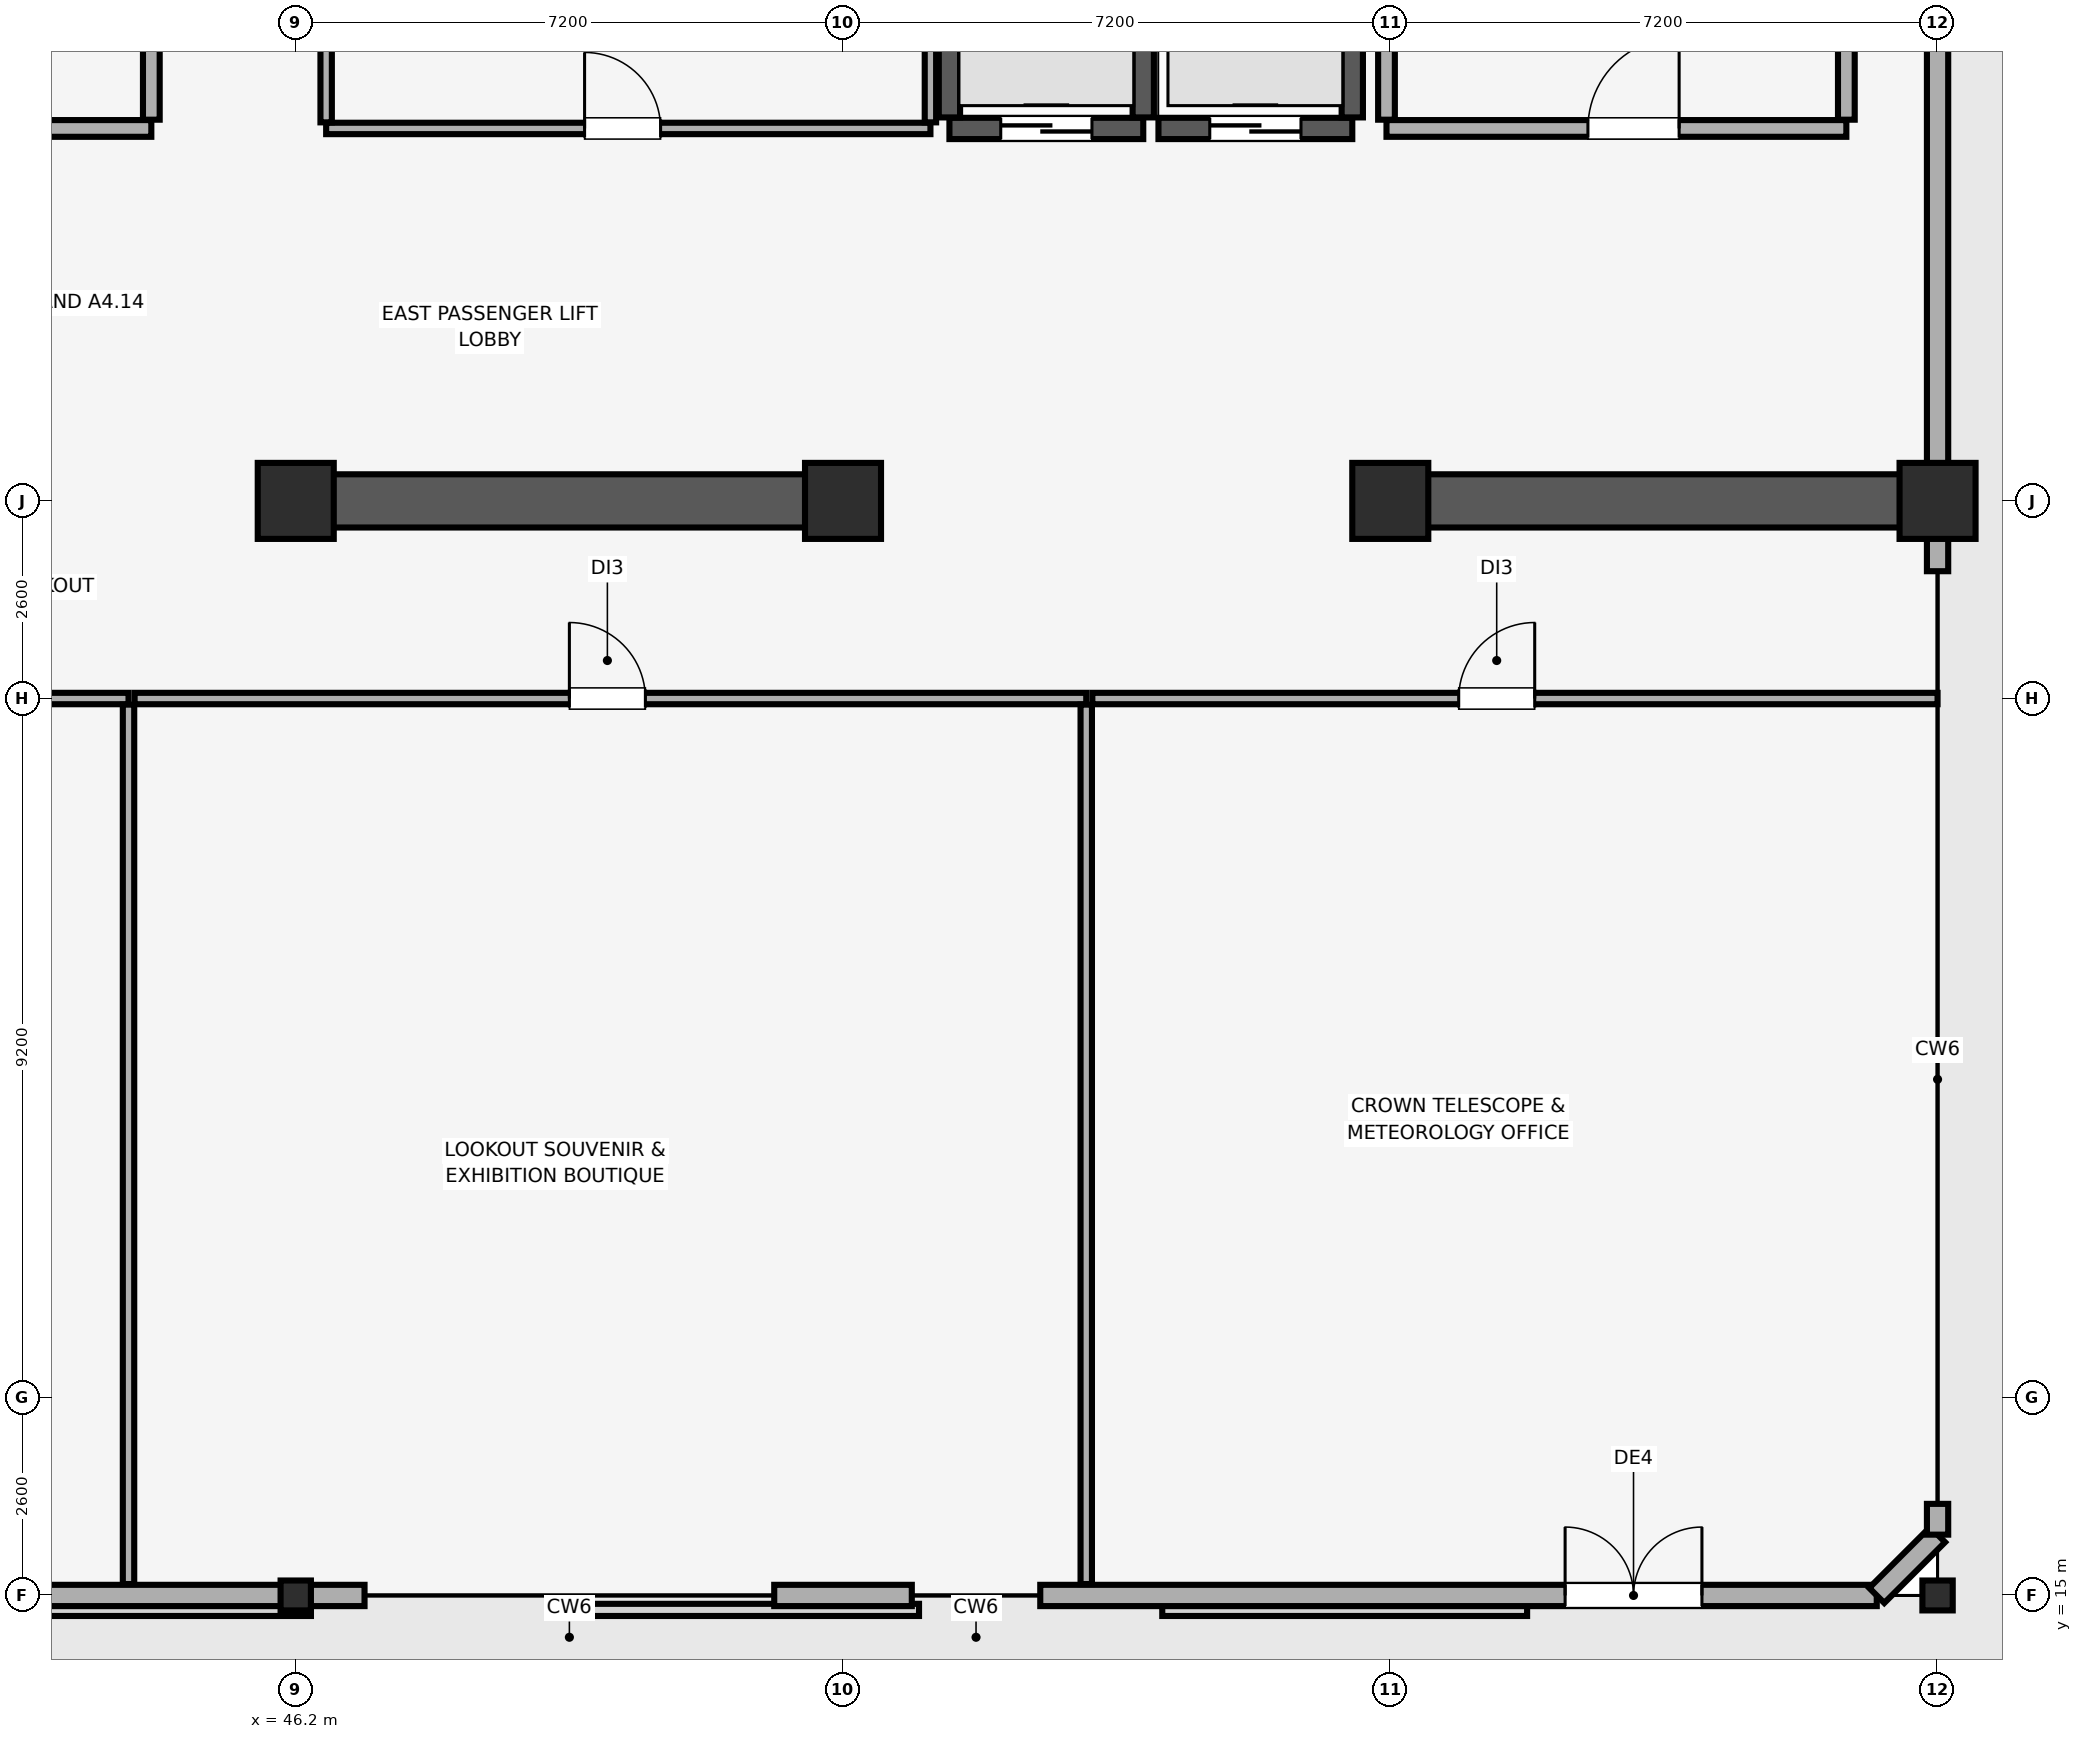
"""IFC4 building model, lengths in metres.
Left out: names, types, materials, properties, quantities, classifications, styles, units other than length and angle.
Written with IfcOpenShell. Run it as: python <this file> out.ifc"""

import sys

from ifc_helpers import new_model, si_unit, direction, frame, frame_2d, origin, origin_2d, place, context, subcontext, project, spatial, rectangle, i_section, extrude, element, fill, save


model = new_model("IFC4")
c1 = context("Model", 3, precision=1e-05, world=origin(), true_north=direction((0.0, 1.0)))
c2 = subcontext(c1, "Body", "Model", "MODEL_VIEW")
j1 = project(units=[si_unit("LENGTHUNIT", "METRE"), si_unit("PLANEANGLEUNIT", "RADIAN")], contexts=[c1])
p1 = place(None, origin())
s1 = spatial("IfcSite", under=j1, at=p1, CompositionType="ELEMENT")
p2 = place(p1, origin())
s2 = spatial("IfcBuilding", under=s1, at=p2, CompositionType="ELEMENT")
p3 = place(p2, frame((0.0, 0.0, 310.7)))
s3 = spatial("IfcBuildingStorey", under=s2, at=p3, CompositionType="ELEMENT", Elevation=310.7)
for number, where, z_axis, x_axis in (
    (1, (46.2, 29.4, 0.0), (0.0, 0.0, 1.0), (1.0, 0.0, 0.0)),
    (2, (53.4, 29.4, 0.0), (0.0, 0.0, 1.0), (1.0, 0.0, 0.0)),
    (3, (60.6, 29.4, 0.0), (0.0, 0.0, 1.0), (1.0, 0.0, 0.0)),
    (4, (67.8, 29.4, 0.0), (0.0, 0.0, 1.0), (1.0, 0.0, 0.0)),
):
    element("IfcColumn", number, at=place(p3, frame(where, z_axis=z_axis, x_axis=x_axis)), inside=s3, PredefinedType="COLUMN", context=c2, shape_type="SweptSolid", body=[
        extrude(rectangle(XDim=1.0, YDim=1.0, at=origin_2d()), origin(), (0.0, 0.0, 1.0), 7.5),
    ])
for number, where, z_axis, x_axis in (
    (5, (46.2, 15.0, 0.0), (0.0, 0.0, 1.0), (1.0, 0.0, 0.0)),
    (6, (67.8, 15.0, 0.0), (0.0, 0.0, 1.0), (1.0, 0.0, 0.0)),
):
    element("IfcColumn", number, at=place(p3, frame(where, z_axis=z_axis, x_axis=x_axis)), inside=s3, PredefinedType="COLUMN", context=c2, shape_type="SweptSolid", body=[
        extrude(i_section(OverallWidth=0.399, OverallDepth=0.394, WebThickness=0.023, FlangeThickness=0.037, FilletRadius=0.015, at=origin_2d()), origin(), (0.0, 0.0, 1.0), 7.5),
    ])
p4 = place(p3, frame((36.895, 15.0, 0.0), z_axis=(0.0, 0.0, 1.0), x_axis=(1.0, 0.0, 0.0)))
e7 = element("IfcWall", 7, at=p4, inside=s3, PredefinedType="SOLIDWALL", context=c2, shape_type="SweptSolid", body=[
    extrude(rectangle(XDim=10.21, YDim=0.28, at=frame_2d((5.105, 0.0))), origin(), (0.0, 0.0, 1.0), 7.0),
])
p5 = place(p4, frame((3.405, 0.0, 0.0)))
e8 = element("IfcOpeningElement", 8, at=p5, cuts=e7, PredefinedType="OPENING", context=c2, shape_type="SweptSolid", body=[
    extrude(rectangle(XDim=1.8, YDim=2.3, at=frame_2d((0.9, 1.15))), frame((0.0, 0.15, 0.0), z_axis=(0.0, -1.0, 0.0), x_axis=(1.0, 0.0, 0.0)), (0.0, 0.0, 1.0), 0.3),
])
p6 = place(p3, frame((52.495, 15.0, 0.0), z_axis=(0.0, 0.0, 1.0), x_axis=(1.0, 0.0, 0.0)))
e9 = element("IfcWall", 9, at=p6, inside=s3, PredefinedType="SOLIDWALL", context=c2, shape_type="SweptSolid", body=[
    extrude(rectangle(XDim=1.81, YDim=0.28, at=frame_2d((0.905, 0.0))), origin(), (0.0, 0.0, 1.0), 7.0),
])
p7 = place(p3, frame((55.995, 15.0, 0.0), z_axis=(0.0, 0.0, 1.0), x_axis=(1.0, 0.0, 0.0)))
e10 = element("IfcWall", 10, at=p7, inside=s3, PredefinedType="SOLIDWALL", context=c2, shape_type="SweptSolid", body=[
    extrude(rectangle(XDim=11.005, YDim=0.28, at=frame_2d((5.502, 0.0))), origin(), (0.0, 0.0, 1.0), 7.0),
])
p8 = place(p7, frame((6.905, 0.0, 0.0)))
e11 = element("IfcOpeningElement", 11, at=p8, cuts=e10, PredefinedType="OPENING", context=c2, shape_type="SweptSolid", body=[
    extrude(rectangle(XDim=1.8, YDim=2.3, at=frame_2d((0.9, 1.15))), frame((0.0, 0.15, 0.0), z_axis=(0.0, -1.0, 0.0), x_axis=(1.0, 0.0, 0.0)), (0.0, 0.0, 1.0), 0.3),
])
p9 = place(p3, frame((67.0, 15.0, 0.0), z_axis=(0.0, 0.0, 1.0), x_axis=(0.707106781187, 0.707106781187, 0.0)))
e12 = element("IfcWall", 12, at=p9, inside=s3, PredefinedType="SOLIDWALL", context=c2, shape_type="SweptSolid", body=[
    extrude(rectangle(XDim=1.131, YDim=0.28, at=frame_2d((0.566, 0.0))), origin(), (0.0, 0.0, 1.0), 7.5),
])
p10 = place(p3, frame((67.8, 15.8, 0.0), z_axis=(0.0, 0.0, 1.0), x_axis=(0.0, 1.0, 0.0)))
e13 = element("IfcWall", 13, at=p10, inside=s3, PredefinedType="SOLIDWALL", context=c2, shape_type="SweptSolid", body=[
    extrude(rectangle(XDim=0.405, YDim=0.28, at=frame_2d((0.203, 0.0))), origin(), (0.0, 0.0, 1.0), 7.2),
])
p11 = place(p3, frame((67.8, 28.475, 0.0), z_axis=(0.0, 0.0, 1.0), x_axis=(0.0, 1.0, 0.0)))
e14 = element("IfcWall", 14, at=p11, inside=s3, PredefinedType="SOLIDWALL", context=c2, shape_type="SweptSolid", body=[
    extrude(rectangle(XDim=19.725, YDim=0.28, at=frame_2d((9.862, 0.0))), origin(), (0.0, 0.0, 1.0), 7.2),
])
p12 = place(p3, frame((46.0, 29.4, 0.0), z_axis=(0.0, 0.0, 1.0), x_axis=(1.0, 0.0, 0.0)))
e15 = element("IfcWall", 15, at=p12, inside=s3, PredefinedType="SHEAR", context=c2, shape_type="SweptSolid", body=[
    extrude(rectangle(XDim=7.6, YDim=0.7, at=frame_2d((3.8, 0.0))), origin(), (0.0, 0.0, 1.0), 7.5),
])
p13 = place(p3, frame((60.4, 29.4, 0.0), z_axis=(0.0, 0.0, 1.0), x_axis=(1.0, 0.0, 0.0)))
e16 = element("IfcWall", 16, at=p13, inside=s3, PredefinedType="SHEAR", context=c2, shape_type="SweptSolid", body=[
    extrude(rectangle(XDim=7.255, YDim=0.7, at=frame_2d((3.627, 0.0))), origin(), (0.0, 0.0, 1.0), 7.5),
])
p14 = place(p3, frame((54.8, 34.3, 0.0), z_axis=(0.0, 0.0, 1.0), x_axis=(1.0, 0.0, 0.0)))
e17 = element("IfcWall", 17, at=p14, inside=s3, PredefinedType="SHEAR", context=c2, shape_type="SweptSolid", body=[
    extrude(rectangle(XDim=2.55, YDim=0.28, at=frame_2d((1.275, 0.0))), origin(), (0.0, 0.0, 1.0), 7.5),
])
p15 = place(p14, frame((0.675, 0.0, 0.0)))
e18 = element("IfcOpeningElement", 18, at=p15, cuts=e17, PredefinedType="OPENING", context=c2, shape_type="SweptSolid", body=[
    extrude(rectangle(XDim=1.2, YDim=2.25, at=frame_2d((0.6, 1.125))), frame((0.0, 0.15, 0.0), z_axis=(0.0, -1.0, 0.0), x_axis=(1.0, 0.0, 0.0)), (0.0, 0.0, 1.0), 0.3),
])
for number, where, z_axis, x_axis in (
    (19, (54.8, 34.445, 0.0), (0.0, 0.0, 1.0), (0.0, 1.0, 0.0)),
    (20, (57.35, 34.445, 0.0), (0.0, 0.0, 1.0), (0.0, 1.0, 0.0)),
):
    element("IfcWall", number, at=place(p3, frame(where, z_axis=z_axis, x_axis=x_axis)), inside=s3, PredefinedType="SHEAR", context=c2, shape_type="SweptSolid", body=[
        extrude(rectangle(XDim=2.11, YDim=0.28, at=frame_2d((1.055, 0.0))), origin(), (0.0, 0.0, 1.0), 7.5),
    ])
p16 = place(p3, frame((57.55, 34.3, 0.0), z_axis=(0.0, 0.0, 1.0), x_axis=(1.0, 0.0, 0.0)))
e21 = element("IfcWall", 21, at=p16, inside=s3, PredefinedType="SHEAR", context=c2, shape_type="SweptSolid", body=[
    extrude(rectangle(XDim=2.55, YDim=0.28, at=frame_2d((1.275, 0.0))), origin(), (0.0, 0.0, 1.0), 7.5),
])
p17 = place(p16, frame((0.675, 0.0, 0.0)))
e22 = element("IfcOpeningElement", 22, at=p17, cuts=e21, PredefinedType="OPENING", context=c2, shape_type="SweptSolid", body=[
    extrude(rectangle(XDim=1.2, YDim=2.25, at=frame_2d((0.6, 1.125))), frame((0.0, 0.15, 0.0), z_axis=(0.0, -1.0, 0.0), x_axis=(1.0, 0.0, 0.0)), (0.0, 0.0, 1.0), 0.3),
])
p18 = place(p3, frame((60.1, 34.445, 0.0), z_axis=(0.0, 0.0, 1.0), x_axis=(0.0, 1.0, 0.0)))
e23 = element("IfcWall", 23, at=p18, inside=s3, PredefinedType="SHEAR", context=c2, shape_type="SweptSolid", body=[
    extrude(rectangle(XDim=2.11, YDim=0.28, at=frame_2d((1.055, 0.0))), origin(), (0.0, 0.0, 1.0), 7.5),
])
p19 = place(p3, frame((60.55, 34.3, 0.0), z_axis=(0.0, 0.0, 1.0), x_axis=(1.0, 0.0, 0.0)))
e24 = element("IfcWall", 24, at=p19, inside=s3, PredefinedType="PARTITIONING", context=c2, shape_type="SweptSolid", body=[
    extrude(rectangle(XDim=6.05, YDim=0.22, at=frame_2d((3.025, 0.0))), origin(), (0.0, 0.0, 1.0), 7.5),
])
p20 = place(p19, frame((2.65, 0.0, 0.0)))
e25 = element("IfcOpeningElement", 25, at=p20, cuts=e24, PredefinedType="OPENING", context=c2, shape_type="SweptSolid", body=[
    extrude(rectangle(XDim=1.2, YDim=2.15, at=frame_2d((0.6, 1.075))), frame((0.0, 0.12, 0.0), z_axis=(0.0, -1.0, 0.0), x_axis=(1.0, 0.0, 0.0)), (0.0, 0.0, 1.0), 0.24),
])
p21 = place(p3, frame((60.55, 34.415, 0.0), z_axis=(0.0, 0.0, 1.0), x_axis=(0.0, 1.0, 0.0)))
e26 = element("IfcWall", 26, at=p21, inside=s3, PredefinedType="PARTITIONING", context=c2, shape_type="SweptSolid", body=[
    extrude(rectangle(XDim=5.64, YDim=0.22, at=frame_2d((2.82, 0.0))), origin(), (0.0, 0.0, 1.0), 7.5),
])
p22 = place(p3, frame((66.6, 34.415, 0.0), z_axis=(0.0, 0.0, 1.0), x_axis=(0.0, 1.0, 0.0)))
e27 = element("IfcWall", 27, at=p22, inside=s3, PredefinedType="PARTITIONING", context=c2, shape_type="SweptSolid", body=[
    extrude(rectangle(XDim=5.43, YDim=0.22, at=frame_2d((2.715, 0.0))), origin(), (0.0, 0.0, 1.0), 7.5),
])
p23 = place(p3, frame((39.7, 34.3, 0.0), z_axis=(0.0, 0.0, 1.0), x_axis=(1.0, 0.0, 0.0)))
e28 = element("IfcWall", 28, at=p23, inside=s3, PredefinedType="PARTITIONING", context=c2, shape_type="SweptSolid", body=[
    extrude(rectangle(XDim=4.6, YDim=0.22, at=frame_2d((2.3, 0.0))), origin(), (0.0, 0.0, 1.0), 7.5),
])
p24 = place(p23, frame((1.7, 0.0, 0.0)))
e29 = element("IfcOpeningElement", 29, at=p24, cuts=e28, PredefinedType="OPENING", context=c2, shape_type="SweptSolid", body=[
    extrude(rectangle(XDim=1.2, YDim=2.15, at=frame_2d((0.6, 1.075))), frame((0.0, 0.12, 0.0), z_axis=(0.0, -1.0, 0.0), x_axis=(1.0, 0.0, 0.0)), (0.0, 0.0, 1.0), 0.24),
])
p25 = place(p3, frame((44.3, 34.415, 0.0), z_axis=(0.0, 0.0, 1.0), x_axis=(0.0, 1.0, 0.0)))
e30 = element("IfcWall", 30, at=p25, inside=s3, PredefinedType="PARTITIONING", context=c2, shape_type="SweptSolid", body=[
    extrude(rectangle(XDim=5.785, YDim=0.22, at=frame_2d((2.893, 0.0))), origin(), (0.0, 0.0, 1.0), 7.5),
])
p26 = place(p3, frame((46.6, 34.3, 0.0), z_axis=(0.0, 0.0, 1.0), x_axis=(1.0, 0.0, 0.0)))
e31 = element("IfcWall", 31, at=p26, inside=s3, PredefinedType="PARTITIONING", context=c2, shape_type="SweptSolid", body=[
    extrude(rectangle(XDim=7.95, YDim=0.15, at=frame_2d((3.975, 0.0))), origin(), (0.0, 0.0, 1.0), 7.5),
])
p27 = place(p26, frame((3.4, 0.0, 0.0)))
e32 = element("IfcOpeningElement", 32, at=p27, cuts=e31, PredefinedType="OPENING", context=c2, shape_type="SweptSolid", body=[
    extrude(rectangle(XDim=1.0, YDim=2.15, at=frame_2d((0.5, 1.075))), frame((0.0, 0.085, 0.0), z_axis=(0.0, -1.0, 0.0), x_axis=(1.0, 0.0, 0.0)), (0.0, 0.0, 1.0), 0.17),
])
for number, where, z_axis, x_axis in (
    (33, (46.6, 34.38, 0.0), (0.0, 0.0, 1.0), (0.0, 1.0, 0.0)),
    (34, (54.55, 34.38, 0.0), (0.0, 0.0, 1.0), (0.0, 1.0, 0.0)),
):
    element("IfcWall", number, at=place(p3, frame(where, z_axis=z_axis, x_axis=x_axis)), inside=s3, PredefinedType="PARTITIONING", context=c2, shape_type="SweptSolid", body=[
        extrude(rectangle(XDim=4.94, YDim=0.15, at=frame_2d((2.47, 0.0))), origin(), (0.0, 0.0, 1.0), 7.5),
    ])
p28 = place(p3, frame((29.48, 26.8, 0.0), z_axis=(0.0, 0.0, 1.0), x_axis=(1.0, 0.0, 0.0)))
e35 = element("IfcWall", 35, at=p28, inside=s3, PredefinedType="PARTITIONING", context=c2, shape_type="SweptSolid", body=[
    extrude(rectangle(XDim=14.52, YDim=0.15, at=frame_2d((7.26, 0.0))), origin(), (0.0, 0.0, 1.0), 7.5),
])
p29 = place(p28, frame((4.52, 0.0, 0.0)))
e36 = element("IfcOpeningElement", 36, at=p29, cuts=e35, PredefinedType="OPENING", context=c2, shape_type="SweptSolid", body=[
    extrude(rectangle(XDim=1.0, YDim=2.15, at=frame_2d((0.5, 1.075))), frame((0.0, 0.085, 0.0), z_axis=(0.0, -1.0, 0.0), x_axis=(1.0, 0.0, 0.0)), (0.0, 0.0, 1.0), 0.17),
])
p30 = place(p3, frame((44.0, 15.15, 0.0), z_axis=(0.0, 0.0, 1.0), x_axis=(0.0, 1.0, 0.0)))
e37 = element("IfcWall", 37, at=p30, inside=s3, PredefinedType="PARTITIONING", context=c2, shape_type="SweptSolid", body=[
    extrude(rectangle(XDim=11.57, YDim=0.15, at=frame_2d((5.785, 0.0))), origin(), (0.0, 0.0, 1.0), 7.5),
])
p31 = place(p3, frame((44.08, 26.8, 0.0), z_axis=(0.0, 0.0, 1.0), x_axis=(1.0, 0.0, 0.0)))
e38 = element("IfcWall", 38, at=p31, inside=s3, PredefinedType="PARTITIONING", context=c2, shape_type="SweptSolid", body=[
    extrude(rectangle(XDim=12.52, YDim=0.15, at=frame_2d((6.26, 0.0))), origin(), (0.0, 0.0, 1.0), 7.5),
])
p32 = place(p31, frame((5.72, 0.0, 0.0)))
e39 = element("IfcOpeningElement", 39, at=p32, cuts=e38, PredefinedType="OPENING", context=c2, shape_type="SweptSolid", body=[
    extrude(rectangle(XDim=1.0, YDim=2.15, at=frame_2d((0.5, 1.075))), frame((0.0, 0.085, 0.0), z_axis=(0.0, -1.0, 0.0), x_axis=(1.0, 0.0, 0.0)), (0.0, 0.0, 1.0), 0.17),
])
p33 = place(p3, frame((56.6, 15.15, 0.0), z_axis=(0.0, 0.0, 1.0), x_axis=(0.0, 1.0, 0.0)))
e40 = element("IfcWall", 40, at=p33, inside=s3, PredefinedType="PARTITIONING", context=c2, shape_type="SweptSolid", body=[
    extrude(rectangle(XDim=11.57, YDim=0.15, at=frame_2d((5.785, 0.0))), origin(), (0.0, 0.0, 1.0), 7.5),
])
p34 = place(p3, frame((56.68, 26.8, 0.0), z_axis=(0.0, 0.0, 1.0), x_axis=(1.0, 0.0, 0.0)))
e41 = element("IfcWall", 41, at=p34, inside=s3, PredefinedType="PARTITIONING", context=c2, shape_type="SweptSolid", body=[
    extrude(rectangle(XDim=11.12, YDim=0.15, at=frame_2d((5.56, 0.0))), origin(), (0.0, 0.0, 1.0), 7.5),
])
p35 = place(p34, frame((4.82, 0.0, 0.0)))
e42 = element("IfcOpeningElement", 42, at=p35, cuts=e41, PredefinedType="OPENING", context=c2, shape_type="SweptSolid", body=[
    extrude(rectangle(XDim=1.0, YDim=2.15, at=frame_2d((0.5, 1.075))), frame((0.0, 0.085, 0.0), z_axis=(0.0, -1.0, 0.0), x_axis=(1.0, 0.0, 0.0)), (0.0, 0.0, 1.0), 0.17),
])
p36 = place(p8, origin())
e43 = element("IfcDoor", 43, at=p36, inside=s3, OperationType="DOUBLE_DOOR_SINGLE_SWING", PredefinedType="DOOR", context=c2, shape_type="SweptSolid", body=[
    extrude(rectangle(XDim=1.8, YDim=2.3, at=frame_2d((0.9, 1.15))), frame((0.0, 0.025, 0.0), z_axis=(0.0, -1.0, 0.0), x_axis=(1.0, 0.0, 0.0)), (0.0, 0.0, 1.0), 0.05),
])
fill(e11, e43)
p37 = place(p15, origin())
e44 = element("IfcDoor", 44, at=p37, inside=s3, OperationType="DOUBLE_DOOR_SLIDING", PredefinedType="DOOR", context=c2, shape_type="SweptSolid", body=[
    extrude(rectangle(XDim=1.2, YDim=2.25, at=frame_2d((0.6, 1.125))), frame((0.0, 0.025, 0.0), z_axis=(0.0, -1.0, 0.0), x_axis=(1.0, 0.0, 0.0)), (0.0, 0.0, 1.0), 0.05),
])
fill(e18, e44)
p38 = place(p17, origin())
e45 = element("IfcDoor", 45, at=p38, inside=s3, OperationType="DOUBLE_DOOR_SLIDING", PredefinedType="DOOR", context=c2, shape_type="SweptSolid", body=[
    extrude(rectangle(XDim=1.2, YDim=2.25, at=frame_2d((0.6, 1.125))), frame((0.0, 0.025, 0.0), z_axis=(0.0, -1.0, 0.0), x_axis=(1.0, 0.0, 0.0)), (0.0, 0.0, 1.0), 0.05),
])
fill(e22, e45)
p39 = place(p20, origin())
e46 = element("IfcDoor", 46, at=p39, inside=s3, OperationType="SINGLE_SWING_RIGHT", PredefinedType="DOOR", context=c2, shape_type="SweptSolid", body=[
    extrude(rectangle(XDim=1.2, YDim=2.15, at=frame_2d((0.6, 1.075))), frame((0.0, 0.025, 0.0), z_axis=(0.0, -1.0, 0.0), x_axis=(1.0, 0.0, 0.0)), (0.0, 0.0, 1.0), 0.05),
])
fill(e25, e46)
p40 = place(p27, origin())
e47 = element("IfcDoor", 47, at=p40, inside=s3, OperationType="SINGLE_SWING_LEFT", PredefinedType="DOOR", context=c2, shape_type="SweptSolid", body=[
    extrude(rectangle(XDim=1.0, YDim=2.15, at=frame_2d((0.5, 1.075))), frame((0.0, 0.025, 0.0), z_axis=(0.0, -1.0, 0.0), x_axis=(1.0, 0.0, 0.0)), (0.0, 0.0, 1.0), 0.05),
])
fill(e32, e47)
p41 = place(p32, origin())
e48 = element("IfcDoor", 48, at=p41, inside=s3, OperationType="SINGLE_SWING_LEFT", PredefinedType="DOOR", context=c2, shape_type="SweptSolid", body=[
    extrude(rectangle(XDim=1.0, YDim=2.15, at=frame_2d((0.5, 1.075))), frame((0.0, 0.025, 0.0), z_axis=(0.0, -1.0, 0.0), x_axis=(1.0, 0.0, 0.0)), (0.0, 0.0, 1.0), 0.05),
])
fill(e39, e48)
p42 = place(p35, origin())
e49 = element("IfcDoor", 49, at=p42, inside=s3, OperationType="SINGLE_SWING_RIGHT", PredefinedType="DOOR", context=c2, shape_type="SweptSolid", body=[
    extrude(rectangle(XDim=1.0, YDim=2.15, at=frame_2d((0.5, 1.075))), frame((0.0, 0.025, 0.0), z_axis=(0.0, -1.0, 0.0), x_axis=(1.0, 0.0, 0.0)), (0.0, 0.0, 1.0), 0.05),
])
fill(e42, e49)
save(model, sys.argv[1])
